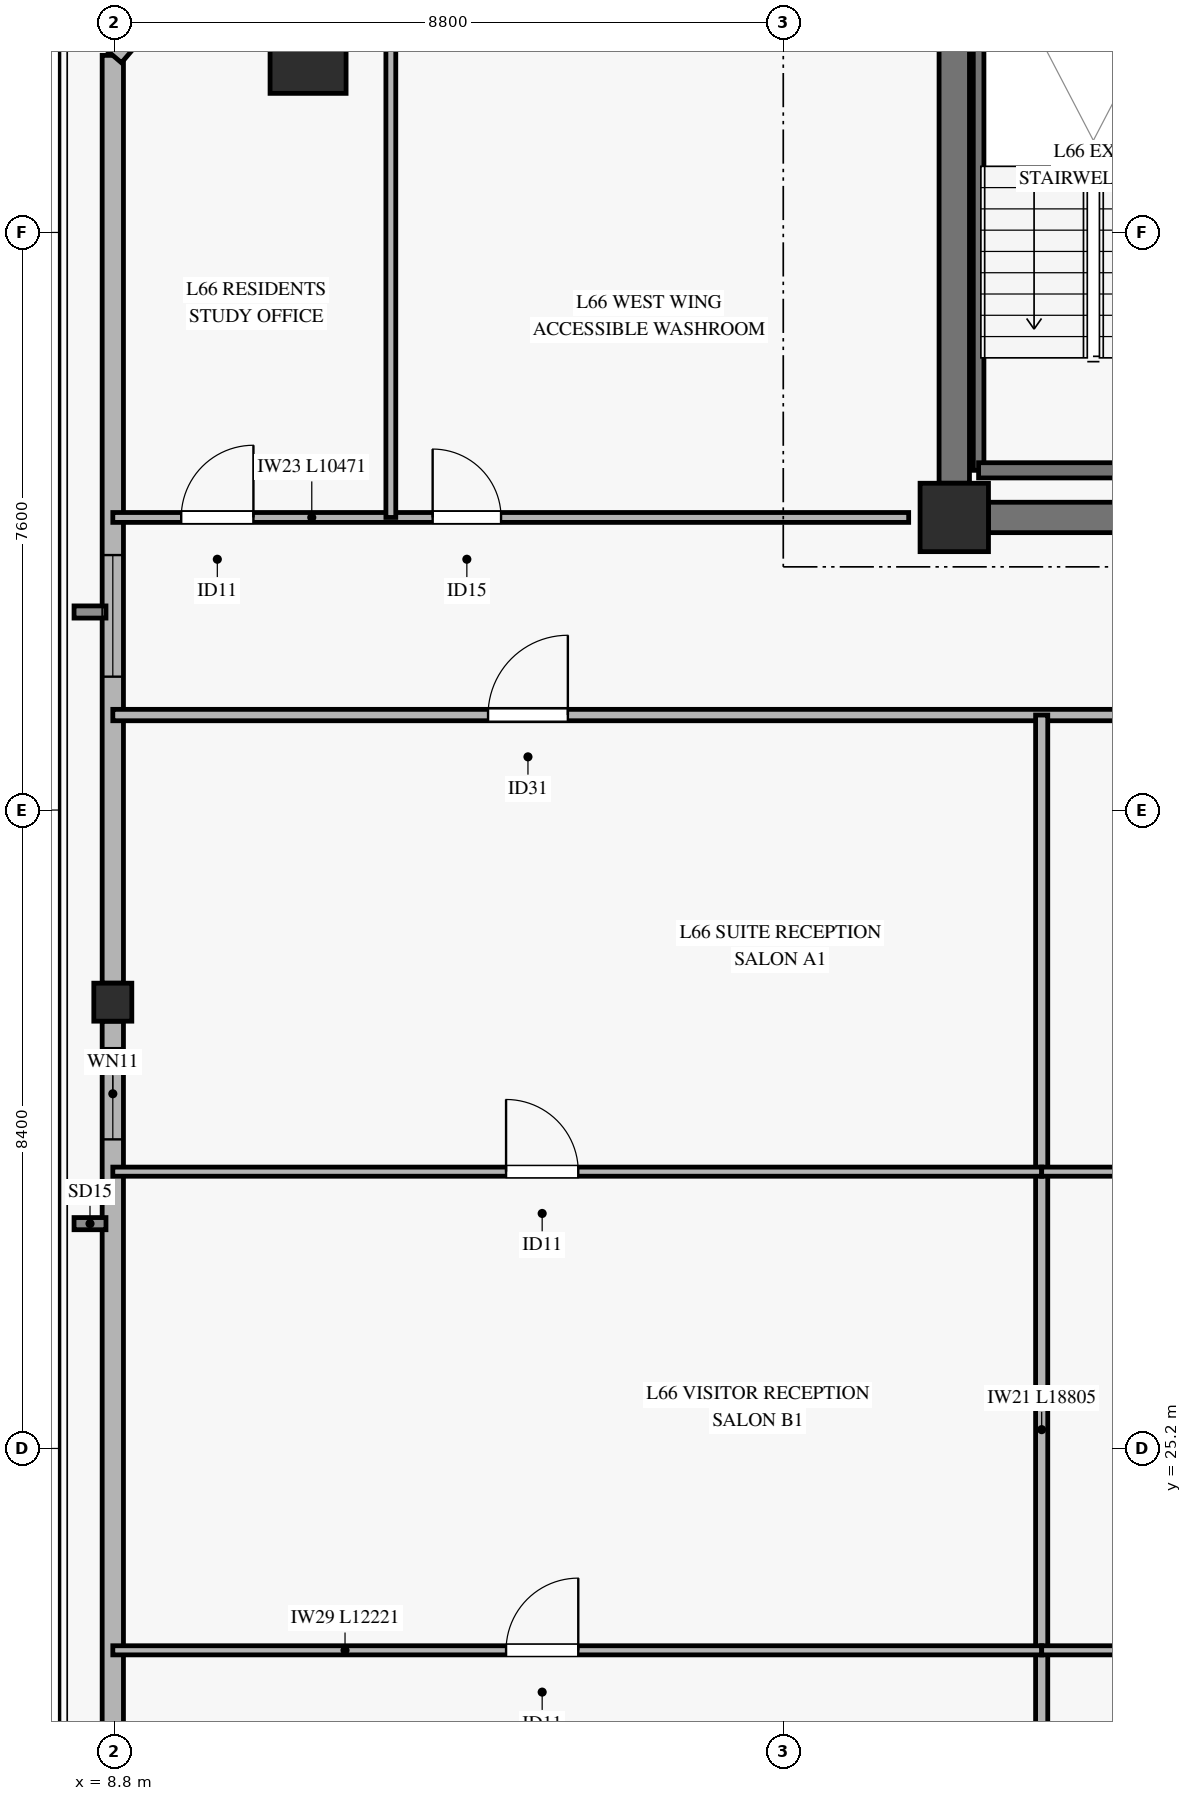
"""IFC4 building model, lengths in metres.
Left out: names, types, materials, properties, quantities, classifications, styles, units other than length and angle.
Written with IfcOpenShell. Run it as: python <this file> out.ifc"""

import sys

from ifc_helpers import new_model, si_unit, direction, frame, frame_2d, origin, origin_2d, place, context, subcontext, project, spatial, rectangle, hollow_rectangle, extrude, source, transform, mapped, element, fill, save


model = new_model("IFC4")
c1 = context("Model", 3, precision=1e-05, world=origin(), true_north=direction((0.0, 1.0)))
c2 = subcontext(c1, "Body", "Model", "MODEL_VIEW")
j1 = project(units=[si_unit("LENGTHUNIT", "METRE"), si_unit("PLANEANGLEUNIT", "RADIAN")], contexts=[c1])
p1 = place(None, origin())
s1 = spatial("IfcSite", under=j1, at=p1, CompositionType="ELEMENT")
p2 = place(p1, origin())
s2 = spatial("IfcBuilding", under=s1, at=p2, CompositionType="ELEMENT")
p3 = place(p2, frame((0.0, 0.0, 258.7)))
s3 = spatial("IfcBuildingStorey", under=s2, at=p3, CompositionType="ELEMENT", Elevation=258.7)
m1 = source(origin(), c2, "Body", "SweptSolid", [
    extrude(rectangle(XDim=0.9, YDim=0.9, at=origin_2d()), origin(), (0.0, 0.0, 1.0), 3.185),
])
p4 = place(p3, frame((19.85, 37.45, 0.0), z_axis=(0.0, 0.0, 1.0), x_axis=(1.0, 0.0, 0.0)))
e1 = element("IfcColumn", 1, at=p4, inside=s3, PredefinedType="PILASTER", context=c2, shape_type="MappedRepresentation", body=[
    mapped(m1, transform((0.0, 0.0, 0.0), x_axis=(1.0, 0.0, 0.0), y_axis=(0.0, 1.0, 0.0), z_axis=(0.0, 0.0, 1.0), scale=1.0)),
])
p5 = place(p3, frame((20.3, 37.45, 0.0), z_axis=(0.0, 0.0, 1.0), x_axis=(1.0, 0.0, 0.0)))
e2 = element("IfcWall", 2, at=p5, inside=s3, PredefinedType="SHEAR", context=c2, shape_type="SweptSolid", body=[
    extrude(rectangle(XDim=10.05, YDim=0.4, at=frame_2d((5.025, 0.0))), origin(), (0.0, 0.0, 1.0), 3.185),
])
p6 = place(p5, frame((4.25, 0.0, 0.0)))
e3 = element("IfcOpeningElement", 3, at=p6, cuts=e2, PredefinedType="OPENING", context=c2, shape_type="SweptSolid", body=[
    extrude(rectangle(XDim=1.2, YDim=2.15, at=frame_2d((0.6, 1.075))), frame((0.0, 0.21, 0.0), z_axis=(0.0, -1.0, 0.0), x_axis=(1.0, 0.0, 0.0)), (0.0, 0.0, 1.0), 0.42),
])
p7 = place(p3, frame((19.85, 37.9, 0.0), z_axis=(0.0, 0.0, 1.0), x_axis=(0.0, 1.0, 0.0)))
e4 = element("IfcWall", 4, at=p7, inside=s3, PredefinedType="SHEAR", context=c2, shape_type="SweptSolid", body=[
    extrude(rectangle(XDim=8.2, YDim=0.4, at=frame_2d((4.1, 0.0))), origin(), (0.0, 0.0, 1.0), 3.185),
])
m2 = source(origin(), c2, "Body", "SweptSolid", [
    extrude(hollow_rectangle(XDim=1.0, YDim=1.0, WallThickness=0.045, at=origin_2d()), origin(), (0.0, 0.0, 1.0), 3.185),
])
p8 = place(p3, frame((11.348, 43.53, 0.0), z_axis=(0.0, 0.0, 1.0), x_axis=(1.0, 0.0, 0.0)))
e5 = element("IfcColumn", 5, at=p8, inside=s3, PredefinedType="COLUMN", context=c2, shape_type="MappedRepresentation", body=[
    mapped(m2, transform((0.0, 0.0, 0.0), x_axis=(1.0, 0.0, 0.0), y_axis=(0.0, 1.0, 0.0), z_axis=(0.0, 0.0, 1.0), scale=1.0)),
])
m3 = source(origin(), c2, "Body", "SweptSolid", [
    extrude(hollow_rectangle(XDim=0.5, YDim=0.5, WallThickness=0.024, at=origin_2d()), origin(), (0.0, 0.0, 1.0), 3.185),
])
p9 = place(p3, frame((8.779, 31.072, 0.0), z_axis=(0.0, 0.0, 1.0), x_axis=(1.0, 0.0, 0.0)))
e6 = element("IfcColumn", 6, at=p9, inside=s3, PredefinedType="COLUMN", context=c2, shape_type="MappedRepresentation", body=[
    mapped(m3, transform((0.0, 0.0, 0.0), x_axis=(1.0, 0.0, 0.0), y_axis=(0.0, 1.0, 0.0), z_axis=(0.0, 0.0, 1.0), scale=1.0)),
])
p10 = place(p3, frame((8.779, 18.614, 0.0), z_axis=(0.0, 0.0, 1.0), x_axis=(0.0, 1.0, 0.0)))
e7 = element("IfcWall", 7, at=p10, inside=s3, PredefinedType="SOLIDWALL", context=c2, shape_type="SweptSolid", body=[
    extrude(rectangle(XDim=12.208, YDim=0.28, at=frame_2d((6.104, 0.0))), origin(), (0.0, 0.0, 1.0), 2.815),
])
p11 = place(p10, frame((10.653, 0.0, 0.45)))
e8 = element("IfcOpeningElement", 8, at=p11, cuts=e7, PredefinedType="OPENING", context=c2, shape_type="SweptSolid", body=[
    extrude(rectangle(XDim=1.2, YDim=2.0, at=frame_2d((0.6, 1.0))), frame((0.0, 0.15, 0.0), z_axis=(0.0, -1.0, 0.0), x_axis=(1.0, 0.0, 0.0)), (0.0, 0.0, 1.0), 0.3),
])
p12 = place(p3, frame((8.779, 31.322, 0.0), z_axis=(0.0, 0.0, 1.0), x_axis=(0.0, 1.0, 0.0)))
e9 = element("IfcWall", 9, at=p12, inside=s3, PredefinedType="SOLIDWALL", context=c2, shape_type="SweptSolid", body=[
    extrude(rectangle(XDim=12.208, YDim=0.28, at=frame_2d((6.104, 0.0))), origin(), (0.0, 0.0, 1.0), 2.815),
])
p13 = place(p12, frame((4.033, 0.0, 0.45)))
e10 = element("IfcOpeningElement", 10, at=p13, cuts=e9, PredefinedType="OPENING", context=c2, shape_type="SweptSolid", body=[
    extrude(rectangle(XDim=1.6, YDim=2.0, at=frame_2d((0.8, 1.0))), frame((0.0, 0.15, 0.0), z_axis=(0.0, -1.0, 0.0), x_axis=(1.0, 0.0, 0.0)), (0.0, 0.0, 1.0), 0.3),
])
p14 = place(p3, frame((11.098, 46.25, 0.0), z_axis=(0.0, 0.0, 1.0), x_axis=(-0.648764006605, -0.760989660727, 0.0)))
e11 = element("IfcWall", 11, at=p14, inside=s3, PredefinedType="SOLIDWALL", context=c2, shape_type="SweptSolid", body=[
    extrude(rectangle(XDim=3.574, YDim=0.3, at=frame_2d((1.787, 0.0))), origin(), (0.0, 0.0, 1.0), 2.815),
])
p15 = place(p14, frame((0.987, 0.0, 0.45)))
e12 = element("IfcOpeningElement", 12, at=p15, cuts=e11, PredefinedType="OPENING", context=c2, shape_type="SweptSolid", body=[
    extrude(rectangle(XDim=1.6, YDim=2.0, at=frame_2d((0.8, 1.0))), frame((0.0, 0.16, 0.0), z_axis=(0.0, -1.0, 0.0), x_axis=(1.0, 0.0, 0.0)), (0.0, 0.0, 1.0), 0.32),
])
p16 = place(p3, frame((20.17, 38.07, 0.0), z_axis=(0.0, 0.0, 1.0), x_axis=(0.0, 1.0, 0.0)))
e13 = element("IfcWall", 13, at=p16, inside=s3, PredefinedType="SOLIDWALL", context=c2, shape_type="SweptSolid", body=[
    extrude(rectangle(XDim=7.25, YDim=0.14, at=frame_2d((3.625, 0.0))), origin(), (0.0, 0.0, 1.0), 3.4),
])
p17 = place(p3, frame((20.17, 38.07, 0.0), z_axis=(0.0, 0.0, 1.0), x_axis=(1.0, 0.0, 0.0)))
e14 = element("IfcWall", 14, at=p17, inside=s3, PredefinedType="SOLIDWALL", context=c2, shape_type="SweptSolid", body=[
    extrude(rectangle(XDim=3.05, YDim=0.2, at=frame_2d((1.525, 0.0))), origin(), (0.0, 0.0, 1.0), 3.4),
])
p18 = place(p3, frame((8.779, 34.85, 0.0), z_axis=(0.0, 0.0, 1.0), x_axis=(1.0, 0.0, 0.0)))
e15 = element("IfcWall", 15, at=p18, inside=s3, PredefinedType="PARTITIONING", context=c2, shape_type="SweptSolid", body=[
    extrude(rectangle(XDim=52.843, YDim=0.15, at=frame_2d((26.421, 0.0))), origin(), (0.0, 0.0, 1.0), 2.47),
])
p19 = place(p18, frame((4.937, 0.0, 0.0)))
e16 = element("IfcOpeningElement", 16, at=p19, cuts=e15, PredefinedType="OPENING", context=c2, shape_type="SweptSolid", body=[
    extrude(rectangle(XDim=1.05, YDim=2.15, at=frame_2d((0.525, 1.075))), frame((0.0, 0.085, 0.0), z_axis=(0.0, -1.0, 0.0), x_axis=(1.0, 0.0, 0.0)), (0.0, 0.0, 1.0), 0.17),
])
p20 = place(p18, frame((17.102, 0.0, 0.0)))
e17 = element("IfcOpeningElement", 17, at=p20, cuts=e15, PredefinedType="OPENING", context=c2, shape_type="SweptSolid", body=[
    extrude(rectangle(XDim=1.05, YDim=2.15, at=frame_2d((0.525, 1.075))), frame((0.0, 0.085, 0.0), z_axis=(0.0, -1.0, 0.0), x_axis=(1.0, 0.0, 0.0)), (0.0, 0.0, 1.0), 0.17),
])
p21 = place(p18, frame((29.122, 0.0, 0.0)))
e18 = element("IfcOpeningElement", 18, at=p21, cuts=e15, PredefinedType="OPENING", context=c2, shape_type="SweptSolid", body=[
    extrude(rectangle(XDim=1.05, YDim=2.15, at=frame_2d((0.525, 1.075))), frame((0.0, 0.085, 0.0), z_axis=(0.0, -1.0, 0.0), x_axis=(1.0, 0.0, 0.0)), (0.0, 0.0, 1.0), 0.17),
])
p22 = place(p18, frame((42.507, 0.0, 0.0)))
e19 = element("IfcOpeningElement", 19, at=p22, cuts=e15, PredefinedType="OPENING", context=c2, shape_type="SweptSolid", body=[
    extrude(rectangle(XDim=1.05, YDim=2.15, at=frame_2d((0.525, 1.075))), frame((0.0, 0.085, 0.0), z_axis=(0.0, -1.0, 0.0), x_axis=(1.0, 0.0, 0.0)), (0.0, 0.0, 1.0), 0.17),
])
p23 = place(p3, frame((21.0, 16.045, 0.0), z_axis=(0.0, 0.0, 1.0), x_axis=(0.0, 1.0, 0.0)))
e20 = element("IfcWall", 20, at=p23, inside=s3, PredefinedType="PARTITIONING", context=c2, shape_type="SweptSolid", body=[
    extrude(rectangle(XDim=18.805, YDim=0.16, at=frame_2d((9.403, 0.0))), origin(), (0.0, 0.0, 1.0), 2.77),
])
p24 = place(p3, frame((8.779, 22.544, 0.0), z_axis=(0.0, 0.0, 1.0), x_axis=(1.0, 0.0, 0.0)))
e21 = element("IfcWall", 21, at=p24, inside=s3, PredefinedType="PARTITIONING", context=c2, shape_type="SweptSolid", body=[
    extrude(rectangle(XDim=12.221, YDim=0.12, at=frame_2d((6.11, 0.0))), origin(), (0.0, 0.0, 1.0), 2.47),
])
p25 = place(p24, frame((5.174, 0.0, 0.0)))
e22 = element("IfcOpeningElement", 22, at=p25, cuts=e21, PredefinedType="OPENING", context=c2, shape_type="SweptSolid", body=[
    extrude(rectangle(XDim=0.95, YDim=2.1, at=frame_2d((0.475, 1.05))), frame((0.0, 0.07, 0.0), z_axis=(0.0, -1.0, 0.0), x_axis=(1.0, 0.0, 0.0)), (0.0, 0.0, 1.0), 0.14),
])
p26 = place(p3, frame((8.779, 28.842, 0.0), z_axis=(0.0, 0.0, 1.0), x_axis=(1.0, 0.0, 0.0)))
e23 = element("IfcWall", 23, at=p26, inside=s3, PredefinedType="PARTITIONING", context=c2, shape_type="SweptSolid", body=[
    extrude(rectangle(XDim=12.221, YDim=0.12, at=frame_2d((6.11, 0.0))), origin(), (0.0, 0.0, 1.0), 2.47),
])
p27 = place(p26, frame((5.174, 0.0, 0.0)))
e24 = element("IfcOpeningElement", 24, at=p27, cuts=e23, PredefinedType="OPENING", context=c2, shape_type="SweptSolid", body=[
    extrude(rectangle(XDim=0.95, YDim=2.1, at=frame_2d((0.475, 1.05))), frame((0.0, 0.07, 0.0), z_axis=(0.0, -1.0, 0.0), x_axis=(1.0, 0.0, 0.0)), (0.0, 0.0, 1.0), 0.14),
])
p28 = place(p3, frame((21.0, 22.544, 0.0), z_axis=(0.0, 0.0, 1.0), x_axis=(1.0, 0.0, 0.0)))
e25 = element("IfcWall", 25, at=p28, inside=s3, PredefinedType="PARTITIONING", context=c2, shape_type="SweptSolid", body=[
    extrude(rectangle(XDim=12.4, YDim=0.12, at=frame_2d((6.2, 0.0))), origin(), (0.0, 0.0, 1.0), 2.47),
])
p29 = place(p28, frame((5.126, 0.0, 0.0)))
e26 = element("IfcOpeningElement", 26, at=p29, cuts=e25, PredefinedType="OPENING", context=c2, shape_type="SweptSolid", body=[
    extrude(rectangle(XDim=0.95, YDim=2.1, at=frame_2d((0.475, 1.05))), frame((0.0, 0.07, 0.0), z_axis=(0.0, -1.0, 0.0), x_axis=(1.0, 0.0, 0.0)), (0.0, 0.0, 1.0), 0.14),
])
p30 = place(p3, frame((21.0, 28.842, 0.0), z_axis=(0.0, 0.0, 1.0), x_axis=(1.0, 0.0, 0.0)))
e27 = element("IfcWall", 27, at=p30, inside=s3, PredefinedType="PARTITIONING", context=c2, shape_type="SweptSolid", body=[
    extrude(rectangle(XDim=12.4, YDim=0.12, at=frame_2d((6.2, 0.0))), origin(), (0.0, 0.0, 1.0), 2.47),
])
p31 = place(p30, frame((5.126, 0.0, 0.0)))
e28 = element("IfcOpeningElement", 28, at=p31, cuts=e27, PredefinedType="OPENING", context=c2, shape_type="SweptSolid", body=[
    extrude(rectangle(XDim=0.95, YDim=2.1, at=frame_2d((0.475, 1.05))), frame((0.0, 0.07, 0.0), z_axis=(0.0, -1.0, 0.0), x_axis=(1.0, 0.0, 0.0)), (0.0, 0.0, 1.0), 0.14),
])
p32 = place(p3, frame((8.779, 37.45, 0.0), z_axis=(0.0, 0.0, 1.0), x_axis=(1.0, 0.0, 0.0)))
e29 = element("IfcWall", 29, at=p32, inside=s3, PredefinedType="PARTITIONING", context=c2, shape_type="SweptSolid", body=[
    extrude(rectangle(XDim=10.471, YDim=0.13, at=frame_2d((5.235, 0.0))), origin(), (0.0, 0.0, 1.0), 2.82),
])
p33 = place(p32, frame((0.9, 0.0, 0.0)))
e30 = element("IfcOpeningElement", 30, at=p33, cuts=e29, PredefinedType="OPENING", context=c2, shape_type="SweptSolid", body=[
    extrude(rectangle(XDim=0.95, YDim=2.1, at=frame_2d((0.475, 1.05))), frame((0.0, 0.075, 0.0), z_axis=(0.0, -1.0, 0.0), x_axis=(1.0, 0.0, 0.0)), (0.0, 0.0, 1.0), 0.15),
])
p34 = place(p32, frame((4.208, 0.0, 0.0)))
e31 = element("IfcOpeningElement", 31, at=p34, cuts=e29, PredefinedType="OPENING", context=c2, shape_type="SweptSolid", body=[
    extrude(rectangle(XDim=0.9, YDim=2.1, at=frame_2d((0.45, 1.05))), frame((0.0, 0.075, 0.0), z_axis=(0.0, -1.0, 0.0), x_axis=(1.0, 0.0, 0.0)), (0.0, 0.0, 1.0), 0.15),
])
p35 = place(p3, frame((12.437, 37.45, 0.0), z_axis=(0.0, 0.0, 1.0), x_axis=(0.0, 1.0, 0.0)))
e32 = element("IfcWall", 32, at=p35, inside=s3, PredefinedType="PARTITIONING", context=c2, shape_type="SweptSolid", body=[
    extrude(rectangle(XDim=8.8, YDim=0.13, at=frame_2d((4.4, 0.0))), origin(), (0.0, 0.0, 1.0), 3.185),
])
m4 = source(origin(), c2, "Body", "SweptSolid", [
    extrude(rectangle(XDim=1.2, YDim=2.0, at=frame_2d((0.6, 1.0))), frame((0.0, 0.03, 0.0), z_axis=(0.0, -1.0, 0.0), x_axis=(1.0, 0.0, 0.0)), (0.0, 0.0, 1.0), 0.06),
])
p36 = place(p11, origin())
e33 = element("IfcWindow", 33, at=p36, inside=s3, PartitioningType="SINGLE_PANEL", PredefinedType="WINDOW", context=c2, shape_type="MappedRepresentation", body=[
    mapped(m4, transform((0.0, 0.0, 0.0), x_axis=(1.0, 0.0, 0.0), y_axis=(0.0, 1.0, 0.0), z_axis=(0.0, 0.0, 1.0), scale=1.0)),
])
fill(e8, e33)
m5 = source(origin(), c2, "Body", "SweptSolid", [
    extrude(rectangle(XDim=1.6, YDim=2.0, at=frame_2d((0.8, 1.0))), frame((0.0, 0.03, 0.0), z_axis=(0.0, -1.0, 0.0), x_axis=(1.0, 0.0, 0.0)), (0.0, 0.0, 1.0), 0.06),
])
p37 = place(p13, origin())
e34 = element("IfcWindow", 34, at=p37, inside=s3, PartitioningType="SINGLE_PANEL", PredefinedType="WINDOW", context=c2, shape_type="MappedRepresentation", body=[
    mapped(m5, transform((0.0, 0.0, 0.0), x_axis=(1.0, 0.0, 0.0), y_axis=(0.0, 1.0, 0.0), z_axis=(0.0, 0.0, 1.0), scale=1.0)),
])
fill(e10, e34)
m6 = source(origin(), c2, "Body", "SweptSolid", [
    extrude(rectangle(XDim=1.05, YDim=2.15, at=frame_2d((0.525, 1.075))), frame((0.0, 0.025, 0.0), z_axis=(0.0, -1.0, 0.0), x_axis=(1.0, 0.0, 0.0)), (0.0, 0.0, 1.0), 0.05),
])
p38 = place(p19, origin())
e35 = element("IfcDoor", 35, at=p38, inside=s3, OperationType="SINGLE_SWING_RIGHT", PredefinedType="DOOR", context=c2, shape_type="MappedRepresentation", body=[
    mapped(m6, transform((0.0, 0.0, 0.0), x_axis=(1.0, 0.0, 0.0), y_axis=(0.0, 1.0, 0.0), z_axis=(0.0, 0.0, 1.0), scale=1.0)),
])
fill(e16, e35)
m7 = source(origin(), c2, "Body", "SweptSolid", [
    extrude(rectangle(XDim=0.95, YDim=2.1, at=frame_2d((0.475, 1.05))), frame((0.0, 0.025, 0.0), z_axis=(0.0, -1.0, 0.0), x_axis=(1.0, 0.0, 0.0)), (0.0, 0.0, 1.0), 0.05),
])
p39 = place(p27, origin())
e36 = element("IfcDoor", 36, at=p39, inside=s3, OperationType="SINGLE_SWING_LEFT", PredefinedType="DOOR", context=c2, shape_type="MappedRepresentation", body=[
    mapped(m7, transform((0.0, 0.0, 0.0), x_axis=(1.0, 0.0, 0.0), y_axis=(0.0, 1.0, 0.0), z_axis=(0.0, 0.0, 1.0), scale=1.0)),
])
fill(e24, e36)
p40 = place(p25, origin())
e37 = element("IfcDoor", 37, at=p40, inside=s3, OperationType="SINGLE_SWING_RIGHT", PredefinedType="DOOR", context=c2, shape_type="MappedRepresentation", body=[
    mapped(m7, transform((0.0, 0.0, 0.0), x_axis=(1.0, 0.0, 0.0), y_axis=(0.0, 1.0, 0.0), z_axis=(0.0, 0.0, 1.0), scale=1.0)),
])
fill(e22, e37)
p41 = place(p33, origin())
e38 = element("IfcDoor", 38, at=p41, inside=s3, OperationType="SINGLE_SWING_RIGHT", PredefinedType="DOOR", context=c2, shape_type="MappedRepresentation", body=[
    mapped(m7, transform((0.0, 0.0, 0.0), x_axis=(1.0, 0.0, 0.0), y_axis=(0.0, 1.0, 0.0), z_axis=(0.0, 0.0, 1.0), scale=1.0)),
])
fill(e30, e38)
m8 = source(origin(), c2, "Body", "SweptSolid", [
    extrude(rectangle(XDim=0.9, YDim=2.1, at=frame_2d((0.45, 1.05))), frame((0.0, 0.025, 0.0), z_axis=(0.0, -1.0, 0.0), x_axis=(1.0, 0.0, 0.0)), (0.0, 0.0, 1.0), 0.05),
])
p42 = place(p34, origin())
e39 = element("IfcDoor", 39, at=p42, inside=s3, OperationType="SINGLE_SWING_LEFT", PredefinedType="DOOR", context=c2, shape_type="MappedRepresentation", body=[
    mapped(m8, transform((0.0, 0.0, 0.0), x_axis=(1.0, 0.0, 0.0), y_axis=(0.0, 1.0, 0.0), z_axis=(0.0, 0.0, 1.0), scale=1.0)),
])
fill(e31, e39)
save(model, sys.argv[1])
